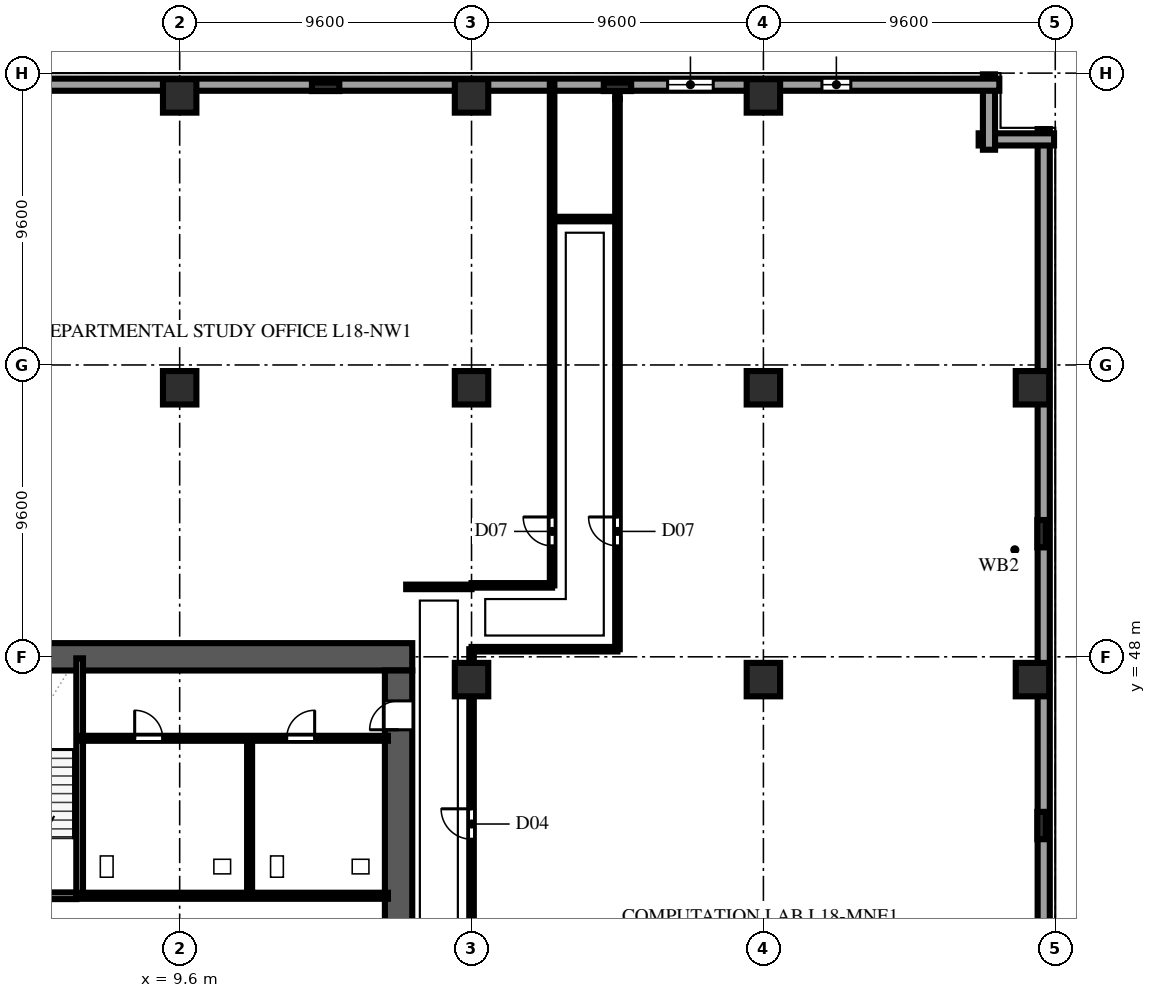
"""IFC4 building model, lengths in metres.
Left out: names, types, materials, properties, quantities, classifications, styles, units other than length and angle.
Written with IfcOpenShell. Run it as: python <this file> out.ifc"""

import sys

from ifc_helpers import new_model, si_unit, direction, frame, frame_2d, origin, origin_2d, place, context, subcontext, project, spatial, rectangle, extrude, element, fill, save


model = new_model("IFC4")
c1 = context("Model", 3, precision=1e-05, world=origin(), true_north=direction((0.0, 1.0)))
c2 = subcontext(c1, "Body", "Model", "MODEL_VIEW")
j1 = project(units=[si_unit("LENGTHUNIT", "METRE"), si_unit("PLANEANGLEUNIT", "RADIAN")], contexts=[c1])
p1 = place(None, origin())
s1 = spatial("IfcSite", under=j1, at=p1, CompositionType="ELEMENT")
p2 = place(p1, origin())
s2 = spatial("IfcBuilding", under=s1, at=p2, CompositionType="ELEMENT")
p3 = place(p2, frame((0.0, 0.0, 73.6)))
s3 = spatial("IfcBuildingStorey", under=s2, at=p3, CompositionType="ELEMENT", Elevation=73.6)
p4 = place(p3, frame((2.65, 48.0, 0.0), z_axis=(0.0, 0.0, 1.0), x_axis=(1.0, 0.0, 0.0)))
e1 = element("IfcWall", 1, at=p4, inside=s3, PredefinedType="SHEAR", context=c2, shape_type="SweptSolid", body=[
    extrude(rectangle(XDim=14.6, YDim=0.9, at=frame_2d((7.3, 0.0))), origin(), (0.0, 0.0, 1.0), 3.54),
])
p5 = place(p3, frame((16.8, 36.4, 0.0), z_axis=(0.0, 0.0, 1.0), x_axis=(0.0, 1.0, 0.0)))
e2 = element("IfcWall", 2, at=p5, inside=s3, PredefinedType="SHEAR", context=c2, shape_type="SweptSolid", body=[
    extrude(rectangle(XDim=11.15, YDim=0.9, at=frame_2d((5.575, 0.0))), origin(), (0.0, 0.0, 1.0), 3.54),
])
p6 = place(p5, frame((9.2, 0.0, 0.0)))
e3 = element("IfcOpeningElement", 3, at=p6, cuts=e2, PredefinedType="OPENING", context=c2, shape_type="SweptSolid", body=[
    extrude(rectangle(XDim=0.95, YDim=2.15, at=frame_2d((0.475, 1.075))), frame((0.0, 0.462, 0.0), z_axis=(0.0, -1.0, 0.0), x_axis=(1.0, 0.0, 0.0)), (0.0, 0.0, 1.0), 0.924),
])
for number, where, z_axis, x_axis in (
    (4, (9.6, 56.85, 0.0), (0.0, 0.0, 1.0), (1.0, 0.0, 0.0)),
    (5, (9.6, 66.45, 0.0), (0.0, 0.0, 1.0), (1.0, 0.0, 0.0)),
    (6, (19.2, 47.25, 0.0), (0.0, 0.0, 1.0), (1.0, 0.0, 0.0)),
    (7, (19.2, 56.85, 0.0), (0.0, 0.0, 1.0), (1.0, 0.0, 0.0)),
    (8, (19.2, 66.45, 0.0), (0.0, 0.0, 1.0), (1.0, 0.0, 0.0)),
    (9, (28.8, 47.25, 0.0), (0.0, 0.0, 1.0), (1.0, 0.0, 0.0)),
    (10, (28.8, 56.85, 0.0), (0.0, 0.0, 1.0), (1.0, 0.0, 0.0)),
    (11, (28.8, 66.45, 0.0), (0.0, 0.0, 1.0), (1.0, 0.0, 0.0)),
    (12, (37.65, 47.25, 0.0), (0.0, 0.0, 1.0), (1.0, 0.0, 0.0)),
    (13, (37.65, 56.85, 0.0), (0.0, 0.0, 1.0), (1.0, 0.0, 0.0)),
):
    element("IfcColumn", number, at=place(p3, frame(where, z_axis=z_axis, x_axis=x_axis)), inside=s3, PredefinedType="COLUMN", context=c2, shape_type="SweptSolid", body=[
        extrude(rectangle(XDim=1.1, YDim=1.1, at=origin_2d()), origin(), (0.0, 0.0, 1.0), 3.8),
    ])
for number, where, z_axis, x_axis in (
    (14, (14.4, 66.75, 0.0), (0.0, 0.0, 1.0), (1.0, 0.0, 0.0)),
    (15, (24.0, 66.75, 0.0), (0.0, 0.0, 1.0), (1.0, 0.0, 0.0)),
    (16, (37.95, 42.45, 0.0), (0.0, 0.0, 1.0), (0.0, 1.0, 0.0)),
    (17, (37.95, 52.05, 0.0), (0.0, 0.0, 1.0), (0.0, 1.0, 0.0)),
):
    element("IfcColumn", number, at=place(p3, frame(where, z_axis=z_axis, x_axis=x_axis)), inside=s3, PredefinedType="PILASTER", context=c2, shape_type="SweptSolid", body=[
        extrude(rectangle(XDim=0.9, YDim=0.28, at=origin_2d()), origin(), (0.0, 0.0, 1.0), 3.8),
    ])
p7 = place(p3, frame((38.02, 37.68, 0.0), z_axis=(0.0, 0.0, 1.0), x_axis=(0.0, 1.0, 0.0)))
e18 = element("IfcWall", 18, at=p7, inside=s3, PredefinedType="SOLIDWALL", context=c2, shape_type="SweptSolid", body=[
    extrude(rectangle(XDim=27.68, YDim=0.4, at=frame_2d((13.84, 0.0))), origin(), (0.0, 0.0, 1.0), 3.54),
])
p8 = place(p3, frame((38.36, 65.02, 0.0), z_axis=(0.0, 0.0, 1.0), x_axis=(-1.0, 0.0, 0.0)))
e19 = element("IfcWall", 19, at=p8, inside=s3, PredefinedType="SOLIDWALL", context=c2, shape_type="SweptSolid", body=[
    extrude(rectangle(XDim=2.48, YDim=0.4, at=frame_2d((1.24, 0.0))), origin(), (0.0, 0.0, 1.0), 3.54),
])
p9 = place(p3, frame((36.22, 64.68, 0.0), z_axis=(0.0, 0.0, 1.0), x_axis=(0.0, 1.0, 0.0)))
e20 = element("IfcWall", 20, at=p9, inside=s3, PredefinedType="SOLIDWALL", context=c2, shape_type="SweptSolid", body=[
    extrude(rectangle(XDim=2.48, YDim=0.4, at=frame_2d((1.24, 0.0))), origin(), (0.0, 0.0, 1.0), 3.54),
])
p10 = place(p3, frame((36.56, 66.82, 0.0), z_axis=(0.0, 0.0, 1.0), x_axis=(-1.0, 0.0, 0.0)))
e21 = element("IfcWall", 21, at=p10, inside=s3, PredefinedType="SOLIDWALL", context=c2, shape_type="SweptSolid", body=[
    extrude(rectangle(XDim=34.72, YDim=0.4, at=frame_2d((17.36, 0.0))), origin(), (0.0, 0.0, 1.0), 3.54),
])
p11 = place(p10, frame((4.885, 0.0, 0.9)))
e22 = element("IfcOpeningElement", 22, at=p11, cuts=e21, PredefinedType="OPENING", context=c2, shape_type="SweptSolid", body=[
    extrude(rectangle(XDim=0.95, YDim=1.85, at=frame_2d((0.475, 0.925))), frame((0.0, 0.212, 0.0), z_axis=(0.0, -1.0, 0.0), x_axis=(1.0, 0.0, 0.0)), (0.0, 0.0, 1.0), 0.424),
])
p12 = place(p10, frame((9.41, 0.0, 0.9)))
e23 = element("IfcOpeningElement", 23, at=p12, cuts=e21, PredefinedType="OPENING", context=c2, shape_type="SweptSolid", body=[
    extrude(rectangle(XDim=1.5, YDim=1.85, at=frame_2d((0.75, 0.925))), frame((0.0, 0.212, 0.0), z_axis=(0.0, -1.0, 0.0), x_axis=(1.0, 0.0, 0.0)), (0.0, 0.0, 1.0), 0.424),
])
p13 = place(p3, frame((2.65, 40.14, 0.0), z_axis=(0.0, 0.0, 1.0), x_axis=(1.0, 0.0, 0.0)))
e24 = element("IfcWall", 24, at=p13, inside=s3, PredefinedType="SOLIDWALL", context=c2, shape_type="SweptSolid", body=[
    extrude(rectangle(XDim=3.55, YDim=0.22, at=frame_2d((1.775, 0.0))), origin(), (0.0, 0.0, 1.0), 3.54),
])
p14 = place(p13, frame((1.2, 0.0, 0.0)))
e25 = element("IfcOpeningElement", 25, at=p14, cuts=e24, PredefinedType="OPENING", context=c2, shape_type="SweptSolid", body=[
    extrude(rectangle(XDim=1.1, YDim=2.2, at=frame_2d((0.55, 1.1))), frame((0.0, 0.122, 0.0), z_axis=(0.0, -1.0, 0.0), x_axis=(1.0, 0.0, 0.0)), (0.0, 0.0, 1.0), 0.244),
])
p15 = place(p3, frame((6.31, 40.14, 0.0), z_axis=(0.0, 0.0, 1.0), x_axis=(0.0, 1.0, 0.0)))
e26 = element("IfcWall", 26, at=p15, inside=s3, PredefinedType="SOLIDWALL", context=c2, shape_type="SweptSolid", body=[
    extrude(rectangle(XDim=7.81, YDim=0.22, at=frame_2d((3.905, 0.0))), origin(), (0.0, 0.0, 1.0), 3.54),
])
p16 = place(p3, frame((6.32, 40.14, 0.0), z_axis=(0.0, 0.0, 1.0), x_axis=(1.0, 0.0, 0.0)))
e27 = element("IfcWall", 27, at=p16, inside=s3, PredefinedType="SOLIDWALL", context=c2, shape_type="SweptSolid", body=[
    extrude(rectangle(XDim=10.13, YDim=0.2, at=frame_2d((5.065, 0.0))), origin(), (0.0, 0.0, 1.0), 3.54),
])
p17 = place(p3, frame((6.32, 45.32, 0.0), z_axis=(0.0, 0.0, 1.0), x_axis=(1.0, 0.0, 0.0)))
e28 = element("IfcWall", 28, at=p17, inside=s3, PredefinedType="PLUMBINGWALL", context=c2, shape_type="SweptSolid", body=[
    extrude(rectangle(XDim=10.13, YDim=0.165, at=frame_2d((5.065, 0.0))), origin(), (0.0, 0.0, 1.0), 3.54),
])
p18 = place(p17, frame((1.8, 0.0, 0.0)))
e29 = element("IfcOpeningElement", 29, at=p18, cuts=e28, PredefinedType="OPENING", context=c2, shape_type="SweptSolid", body=[
    extrude(rectangle(XDim=0.92, YDim=2.15, at=frame_2d((0.46, 1.075))), frame((0.0, 0.094, 0.0), z_axis=(0.0, -1.0, 0.0), x_axis=(1.0, 0.0, 0.0)), (0.0, 0.0, 1.0), 0.189),
])
p19 = place(p17, frame((6.8, 0.0, 0.0)))
e30 = element("IfcOpeningElement", 30, at=p19, cuts=e28, PredefinedType="OPENING", context=c2, shape_type="SweptSolid", body=[
    extrude(rectangle(XDim=0.92, YDim=2.15, at=frame_2d((0.46, 1.075))), frame((0.0, 0.094, 0.0), z_axis=(0.0, -1.0, 0.0), x_axis=(1.0, 0.0, 0.0)), (0.0, 0.0, 1.0), 0.189),
])
p20 = place(p3, frame((11.9, 40.4, 0.0), z_axis=(0.0, 0.0, 1.0), x_axis=(0.0, 1.0, 0.0)))
e31 = element("IfcWall", 31, at=p20, inside=s3, PredefinedType="PLUMBINGWALL", context=c2, shape_type="SweptSolid", body=[
    extrude(rectangle(XDim=4.92, YDim=0.165, at=frame_2d((2.46, 0.0))), origin(), (0.0, 0.0, 1.0), 3.54),
])
p21 = place(p3, frame((17.05, 50.3, 0.0), z_axis=(0.0, 0.0, 1.0), x_axis=(1.0, 0.0, 0.0)))
e32 = element("IfcWall", 32, at=p21, inside=s3, PredefinedType="PARTITIONING", context=c2, shape_type="SweptSolid", body=[
    extrude(rectangle(XDim=2.15, YDim=0.15, at=frame_2d((1.075, 0.0))), origin(), (0.0, 0.0, 1.0), 3.54),
])
p22 = place(p3, frame((19.2, 30.65, 0.0), z_axis=(0.0, 0.0, 1.0), x_axis=(0.0, 1.0, 0.0)))
e33 = element("IfcWall", 33, at=p22, inside=s3, PredefinedType="PARTITIONING", context=c2, shape_type="SweptSolid", body=[
    extrude(rectangle(XDim=17.6, YDim=0.15, at=frame_2d((8.8, 0.0))), origin(), (0.0, 0.0, 1.0), 2.996),
])
p23 = place(p22, frame((11.35, 0.0, 0.0)))
e34 = element("IfcOpeningElement", 34, at=p23, cuts=e33, PredefinedType="OPENING", context=c2, shape_type="SweptSolid", body=[
    extrude(rectangle(XDim=1.0, YDim=2.2, at=frame_2d((0.5, 1.1))), frame((0.0, 0.087, 0.0), z_axis=(0.0, -1.0, 0.0), x_axis=(1.0, 0.0, 0.0)), (0.0, 0.0, 1.0), 0.174),
])
p24 = place(p3, frame((19.2, 48.25, 0.0), z_axis=(0.0, 0.0, 1.0), x_axis=(1.0, 0.0, 0.0)))
e35 = element("IfcWall", 35, at=p24, inside=s3, PredefinedType="PARTITIONING", context=c2, shape_type="SweptSolid", body=[
    extrude(rectangle(XDim=4.8, YDim=0.15, at=frame_2d((2.4, 0.0))), origin(), (0.0, 0.0, 1.0), 3.54),
])
p25 = place(p3, frame((19.2, 50.35, 0.0), z_axis=(0.0, 0.0, 1.0), x_axis=(1.0, 0.0, 0.0)))
e36 = element("IfcWall", 36, at=p25, inside=s3, PredefinedType="PARTITIONING", context=c2, shape_type="SweptSolid", body=[
    extrude(rectangle(XDim=2.65, YDim=0.15, at=frame_2d((1.325, 0.0))), origin(), (0.0, 0.0, 1.0), 3.54),
])
p26 = place(p3, frame((21.85, 62.4, 0.0), z_axis=(0.0, 0.0, 1.0), x_axis=(1.0, 0.0, 0.0)))
e37 = element("IfcWall", 37, at=p26, inside=s3, PredefinedType="PARTITIONING", context=c2, shape_type="SweptSolid", body=[
    extrude(rectangle(XDim=2.15, YDim=0.15, at=frame_2d((1.075, 0.0))), origin(), (0.0, 0.0, 1.0), 3.54),
])
p27 = place(p3, frame((24.0, 48.25, 0.0), z_axis=(0.0, 0.0, 1.0), x_axis=(0.0, 1.0, 0.0)))
e38 = element("IfcWall", 38, at=p27, inside=s3, PredefinedType="PARTITIONING", context=c2, shape_type="SweptSolid", body=[
    extrude(rectangle(XDim=18.094, YDim=0.15, at=frame_2d((9.047, 0.0))), origin(), (0.0, 0.0, 1.0), 3.007),
])
p28 = place(p27, frame((3.4, 0.0, 0.0)))
e39 = element("IfcOpeningElement", 39, at=p28, cuts=e38, PredefinedType="OPENING", context=c2, shape_type="SweptSolid", body=[
    extrude(rectangle(XDim=0.95, YDim=2.15, at=frame_2d((0.475, 1.075))), frame((0.0, 0.087, 0.0), z_axis=(0.0, -1.0, 0.0), x_axis=(1.0, 0.0, 0.0)), (0.0, 0.0, 1.0), 0.174),
])
p29 = place(p3, frame((24.0, 66.344, 0.0), z_axis=(0.0, 0.0, 1.0), x_axis=(0.0, 1.0, 0.0)))
e40 = element("IfcWall", 40, at=p29, inside=s3, PredefinedType="PARTITIONING", context=c2, shape_type="SweptSolid", body=[
    extrude(rectangle(XDim=0.636, YDim=0.15, at=frame_2d((0.318, 0.0))), origin(), (0.0, 0.0, 1.0), 3.54),
])
p30 = place(p3, frame((21.85, 50.35, 0.0), z_axis=(0.0, 0.0, 1.0), x_axis=(0.0, 1.0, 0.0)))
e41 = element("IfcWall", 41, at=p30, inside=s3, PredefinedType="PARTITIONING", context=c2, shape_type="SweptSolid", body=[
    extrude(rectangle(XDim=16.63, YDim=0.15, at=frame_2d((8.315, 0.0))), origin(), (0.0, 0.0, 1.0), 3.54),
])
p31 = place(p30, frame((1.3, 0.0, 0.0)))
e42 = element("IfcOpeningElement", 42, at=p31, cuts=e41, PredefinedType="OPENING", context=c2, shape_type="SweptSolid", body=[
    extrude(rectangle(XDim=0.95, YDim=2.15, at=frame_2d((0.475, 1.075))), frame((0.0, 0.087, 0.0), z_axis=(0.0, -1.0, 0.0), x_axis=(1.0, 0.0, 0.0)), (0.0, 0.0, 1.0), 0.174),
])
p32 = place(p11, origin())
e43 = element("IfcWindow", 43, at=p32, inside=s3, PartitioningType="SINGLE_PANEL", PredefinedType="WINDOW", context=c2, shape_type="SweptSolid", body=[
    extrude(rectangle(XDim=0.95, YDim=1.85, at=frame_2d((0.475, 0.925))), frame((0.0, 0.11, 0.0), z_axis=(0.0, -1.0, 0.0), x_axis=(1.0, 0.0, 0.0)), (0.0, 0.0, 1.0), 0.06),
])
fill(e22, e43)
p33 = place(p12, origin())
e44 = element("IfcWindow", 44, at=p33, inside=s3, PartitioningType="DOUBLE_PANEL_VERTICAL", PredefinedType="WINDOW", context=c2, shape_type="SweptSolid", body=[
    extrude(rectangle(XDim=1.5, YDim=1.85, at=frame_2d((0.75, 0.925))), frame((0.0, 0.11, 0.0), z_axis=(0.0, -1.0, 0.0), x_axis=(1.0, 0.0, 0.0)), (0.0, 0.0, 1.0), 0.06),
])
fill(e23, e44)
p34 = place(p6, origin())
e45 = element("IfcDoor", 45, at=p34, inside=s3, OperationType="SINGLE_SWING_LEFT", PredefinedType="DOOR", context=c2, shape_type="SweptSolid", body=[
    extrude(rectangle(XDim=0.95, YDim=2.15, at=frame_2d((0.475, 1.075))), frame((0.0, 0.025, 0.0), z_axis=(0.0, -1.0, 0.0), x_axis=(1.0, 0.0, 0.0)), (0.0, 0.0, 1.0), 0.05),
])
fill(e3, e45)
p35 = place(p18, origin())
e46 = element("IfcDoor", 46, at=p35, inside=s3, OperationType="SINGLE_SWING_LEFT", PredefinedType="DOOR", context=c2, shape_type="SweptSolid", body=[
    extrude(rectangle(XDim=0.92, YDim=2.15, at=frame_2d((0.46, 1.075))), frame((0.0, 0.025, 0.0), z_axis=(0.0, -1.0, 0.0), x_axis=(1.0, 0.0, 0.0)), (0.0, 0.0, 1.0), 0.05),
])
fill(e29, e46)
p36 = place(p19, origin())
e47 = element("IfcDoor", 47, at=p36, inside=s3, OperationType="SINGLE_SWING_RIGHT", PredefinedType="DOOR", context=c2, shape_type="SweptSolid", body=[
    extrude(rectangle(XDim=0.92, YDim=2.15, at=frame_2d((0.46, 1.075))), frame((0.0, 0.025, 0.0), z_axis=(0.0, -1.0, 0.0), x_axis=(1.0, 0.0, 0.0)), (0.0, 0.0, 1.0), 0.05),
])
fill(e30, e47)
p37 = place(p23, origin())
e48 = element("IfcDoor", 48, at=p37, inside=s3, OperationType="SINGLE_SWING_RIGHT", PredefinedType="DOOR", context=c2, shape_type="SweptSolid", body=[
    extrude(rectangle(XDim=1.0, YDim=2.2, at=frame_2d((0.5, 1.1))), frame((0.0, 0.025, 0.0), z_axis=(0.0, -1.0, 0.0), x_axis=(1.0, 0.0, 0.0)), (0.0, 0.0, 1.0), 0.05),
])
fill(e34, e48)
p38 = place(p28, origin())
e49 = element("IfcDoor", 49, at=p38, inside=s3, OperationType="SINGLE_SWING_RIGHT", PredefinedType="DOOR", context=c2, shape_type="SweptSolid", body=[
    extrude(rectangle(XDim=0.95, YDim=2.15, at=frame_2d((0.475, 1.075))), frame((0.0, 0.025, 0.0), z_axis=(0.0, -1.0, 0.0), x_axis=(1.0, 0.0, 0.0)), (0.0, 0.0, 1.0), 0.05),
])
fill(e39, e49)
p39 = place(p31, origin())
e50 = element("IfcDoor", 50, at=p39, inside=s3, OperationType="SINGLE_SWING_RIGHT", PredefinedType="DOOR", context=c2, shape_type="SweptSolid", body=[
    extrude(rectangle(XDim=0.95, YDim=2.15, at=frame_2d((0.475, 1.075))), frame((0.0, 0.025, 0.0), z_axis=(0.0, -1.0, 0.0), x_axis=(1.0, 0.0, 0.0)), (0.0, 0.0, 1.0), 0.05),
])
fill(e42, e50)
save(model, sys.argv[1])
